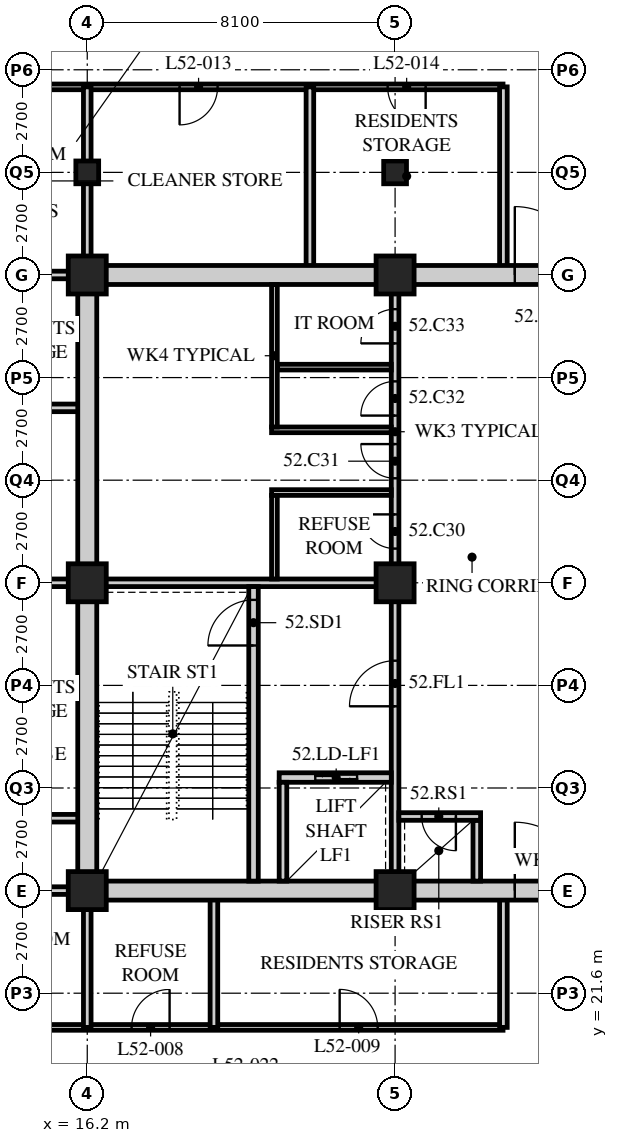
"""IFC4 building model, lengths in metres.
Left out: names, types, materials, properties, quantities, classifications, styles, units other than length and angle.
Written with IfcOpenShell. Run it as: python <this file> out.ifc"""

import sys

from ifc_helpers import new_model, si_unit, direction, frame, frame_2d, origin, origin_2d, place, context, subcontext, project, spatial, rectangle, hollow_rectangle, extrude, element, fill, save


model = new_model("IFC4")
c1 = context("Model", 3, precision=1e-05, world=origin(), true_north=direction((0.0, 1.0)))
c2 = subcontext(c1, "Body", "Model", "MODEL_VIEW")
j1 = project(units=[si_unit("LENGTHUNIT", "METRE"), si_unit("PLANEANGLEUNIT", "RADIAN")], contexts=[c1])
p1 = place(None, origin())
s1 = spatial("IfcSite", under=j1, at=p1, CompositionType="ELEMENT")
p2 = place(p1, origin())
s2 = spatial("IfcBuilding", under=s1, at=p2, CompositionType="ELEMENT")
p3 = place(p2, frame((0.0, 0.0, 202.8)))
s3 = spatial("IfcBuildingStorey", under=s2, at=p3, CompositionType="ELEMENT", Elevation=202.8)
for number, where, z_axis, x_axis in (
    (1, (16.2, 24.3, 0.0), (0.0, 0.0, 1.0), (1.0, 0.0, 0.0)),
    (2, (16.2, 32.4, 0.0), (0.0, 0.0, 1.0), (1.0, 0.0, 0.0)),
    (3, (16.2, 40.5, 0.0), (0.0, 0.0, 1.0), (1.0, 0.0, 0.0)),
):
    element("IfcColumn", number, at=place(p3, frame(where, z_axis=z_axis, x_axis=x_axis)), inside=s3, PredefinedType="COLUMN", context=c2, shape_type="SweptSolid", body=[
        extrude(hollow_rectangle(XDim=1.0, YDim=1.0, WallThickness=0.1, at=origin_2d()), origin(), (0.0, 0.0, 1.0), 3.6),
    ])
p4 = place(p3, frame((16.2, 43.2, 0.0), z_axis=(0.0, 0.0, 1.0), x_axis=(1.0, 0.0, 0.0)))
e4 = element("IfcColumn", 4, at=p4, inside=s3, PredefinedType="COLUMN", context=c2, shape_type="SweptSolid", body=[
    extrude(hollow_rectangle(XDim=0.6, YDim=0.6, WallThickness=0.05, at=origin_2d()), origin(), (0.0, 0.0, 1.0), 3.6),
])
for number, where, z_axis, x_axis in (
    (5, (24.3, 24.3, 0.0), (0.0, 0.0, 1.0), (1.0, 0.0, 0.0)),
    (6, (24.3, 32.4, 0.0), (0.0, 0.0, 1.0), (1.0, 0.0, 0.0)),
    (7, (24.3, 40.5, 0.0), (0.0, 0.0, 1.0), (1.0, 0.0, 0.0)),
):
    element("IfcColumn", number, at=place(p3, frame(where, z_axis=z_axis, x_axis=x_axis)), inside=s3, PredefinedType="COLUMN", context=c2, shape_type="SweptSolid", body=[
        extrude(hollow_rectangle(XDim=1.0, YDim=1.0, WallThickness=0.1, at=origin_2d()), origin(), (0.0, 0.0, 1.0), 3.6),
    ])
p5 = place(p3, frame((24.3, 43.2, 0.0), z_axis=(0.0, 0.0, 1.0), x_axis=(1.0, 0.0, 0.0)))
e8 = element("IfcColumn", 8, at=p5, inside=s3, PredefinedType="COLUMN", context=c2, shape_type="SweptSolid", body=[
    extrude(hollow_rectangle(XDim=0.6, YDim=0.6, WallThickness=0.05, at=origin_2d()), origin(), (0.0, 0.0, 1.0), 3.6),
])
p6 = place(p3, frame((27.14, 45.45, 0.0), z_axis=(0.0, 0.0, 1.0), x_axis=(-1.0, 0.0, 0.0)))
e9 = element("IfcWall", 9, at=p6, inside=s3, PredefinedType="PARTITIONING", context=c2, shape_type="SweptSolid", body=[
    extrude(rectangle(XDim=17.24, YDim=0.15, at=frame_2d((8.62, 0.0))), origin(), (0.0, 0.0, 1.0), 3.39),
])
p7 = place(p6, frame((15.94, 0.0, 0.0)))
e10 = element("IfcOpeningElement", 10, at=p7, cuts=e9, PredefinedType="OPENING", context=c2, shape_type="SweptSolid", body=[
    extrude(rectangle(XDim=1.0, YDim=2.1, at=frame_2d((0.5, 1.05))), frame((0.0, 0.085, 0.0), z_axis=(0.0, -1.0, 0.0), x_axis=(1.0, 0.0, 0.0)), (0.0, 0.0, 1.0), 0.17),
])
p8 = place(p6, frame((12.79, 0.0, 0.0)))
e11 = element("IfcOpeningElement", 11, at=p8, cuts=e9, PredefinedType="OPENING", context=c2, shape_type="SweptSolid", body=[
    extrude(rectangle(XDim=1.0, YDim=2.1, at=frame_2d((0.5, 1.05))), frame((0.0, 0.085, 0.0), z_axis=(0.0, -1.0, 0.0), x_axis=(1.0, 0.0, 0.0)), (0.0, 0.0, 1.0), 0.17),
])
p9 = place(p6, frame((7.511, 0.0, 0.0)))
e12 = element("IfcOpeningElement", 12, at=p9, cuts=e9, PredefinedType="OPENING", context=c2, shape_type="SweptSolid", body=[
    extrude(rectangle(XDim=1.0, YDim=2.1, at=frame_2d((0.5, 1.05))), frame((0.0, 0.085, 0.0), z_axis=(0.0, -1.0, 0.0), x_axis=(1.0, 0.0, 0.0)), (0.0, 0.0, 1.0), 0.17),
])
p10 = place(p6, frame((2.036, 0.0, 0.0)))
e13 = element("IfcOpeningElement", 13, at=p10, cuts=e9, PredefinedType="OPENING", context=c2, shape_type="SweptSolid", body=[
    extrude(rectangle(XDim=1.0, YDim=2.1, at=frame_2d((0.5, 1.05))), frame((0.0, 0.085, 0.0), z_axis=(0.0, -1.0, 0.0), x_axis=(1.0, 0.0, 0.0)), (0.0, 0.0, 1.0), 0.17),
])
p11 = place(p3, frame((9.9, 20.7, 0.0), z_axis=(0.0, 0.0, 1.0), x_axis=(1.0, 0.0, 0.0)))
e14 = element("IfcWall", 14, at=p11, inside=s3, PredefinedType="PARTITIONING", context=c2, shape_type="SweptSolid", body=[
    extrude(rectangle(XDim=17.24, YDim=0.15, at=frame_2d((8.62, 0.0))), origin(), (0.0, 0.0, 1.0), 3.39),
])
p12 = place(p11, frame((2.65, 0.0, 0.0)))
e15 = element("IfcOpeningElement", 15, at=p12, cuts=e14, PredefinedType="OPENING", context=c2, shape_type="SweptSolid", body=[
    extrude(rectangle(XDim=1.0, YDim=2.1, at=frame_2d((0.5, 1.05))), frame((0.0, 0.085, 0.0), z_axis=(0.0, -1.0, 0.0), x_axis=(1.0, 0.0, 0.0)), (0.0, 0.0, 1.0), 0.17),
])
p13 = place(p11, frame((7.467, 0.0, 0.0)))
e16 = element("IfcOpeningElement", 16, at=p13, cuts=e14, PredefinedType="OPENING", context=c2, shape_type="SweptSolid", body=[
    extrude(rectangle(XDim=1.0, YDim=2.1, at=frame_2d((0.5, 1.05))), frame((0.0, 0.085, 0.0), z_axis=(0.0, -1.0, 0.0), x_axis=(1.0, 0.0, 0.0)), (0.0, 0.0, 1.0), 0.17),
])
p14 = place(p11, frame((12.942, 0.0, 0.0)))
e17 = element("IfcOpeningElement", 17, at=p14, cuts=e14, PredefinedType="OPENING", context=c2, shape_type="SweptSolid", body=[
    extrude(rectangle(XDim=1.0, YDim=2.1, at=frame_2d((0.5, 1.05))), frame((0.0, 0.085, 0.0), z_axis=(0.0, -1.0, 0.0), x_axis=(1.0, 0.0, 0.0)), (0.0, 0.0, 1.0), 0.17),
])
for number, where, z_axis, x_axis in (
    (18, (9.9, 32.4, 0.0), (0.0, 0.0, 1.0), (1.0, 0.0, 0.0)),
    (19, (9.9, 26.205, 0.0), (0.0, 0.0, 1.0), (1.0, 0.0, 0.0)),
    (20, (9.9, 37.003, 0.0), (0.0, 0.0, 1.0), (1.0, 0.0, 0.0)),
):
    element("IfcWall", number, at=place(p3, frame(where, z_axis=z_axis, x_axis=x_axis)), inside=s3, PredefinedType="SOLIDWALL", context=c2, shape_type="SweptSolid", body=[
        extrude(rectangle(XDim=6.3, YDim=0.2, at=frame_2d((3.15, 0.0))), origin(), (0.0, 0.0, 1.0), 3.39),
    ])
p15 = place(p3, frame((16.2, 20.7, 0.0), z_axis=(0.0, 0.0, 1.0), x_axis=(0.0, 1.0, 0.0)))
e21 = element("IfcWall", 21, at=p15, inside=s3, PredefinedType="SOLIDWALL", context=c2, shape_type="SweptSolid", body=[
    extrude(rectangle(XDim=3.6, YDim=0.2, at=frame_2d((1.8, 0.0))), origin(), (0.0, 0.0, 1.0), 2.778),
])
for number, where, z_axis, x_axis in (
    (22, (19.533, 20.7, 0.0), (0.0, 0.0, 1.0), (0.0, 1.0, 0.0)),
    (23, (27.15, 20.7, 0.0), (0.0, 0.0, 1.0), (0.0, 1.0, 0.0)),
):
    element("IfcWall", number, at=place(p3, frame(where, z_axis=z_axis, x_axis=x_axis)), inside=s3, PredefinedType="SOLIDWALL", context=c2, shape_type="SweptSolid", body=[
        extrude(rectangle(XDim=3.6, YDim=0.2, at=frame_2d((1.8, 0.0))), origin(), (0.0, 0.0, 1.0), 3.39),
    ])
p16 = place(p3, frame((16.2, 40.5, 0.0), z_axis=(0.0, 0.0, 1.0), x_axis=(0.0, 1.0, 0.0)))
e24 = element("IfcWall", 24, at=p16, inside=s3, PredefinedType="SOLIDWALL", context=c2, shape_type="SweptSolid", body=[
    extrude(rectangle(XDim=4.95, YDim=0.2, at=frame_2d((2.475, 0.0))), origin(), (0.0, 0.0, 1.0), 2.69),
])
for number, where, z_axis, x_axis in (
    (25, (22.059, 45.45, 0.0), (0.0, 0.0, 1.0), (0.0, -1.0, 0.0)),
    (26, (27.15, 40.5, 0.0), (0.0, 0.0, 1.0), (0.0, 1.0, 0.0)),
):
    element("IfcWall", number, at=place(p3, frame(where, z_axis=z_axis, x_axis=x_axis)), inside=s3, PredefinedType="SOLIDWALL", context=c2, shape_type="SweptSolid", body=[
        extrude(rectangle(XDim=4.95, YDim=0.2, at=frame_2d((2.475, 0.0))), origin(), (0.0, 0.0, 1.0), 3.39),
    ])
for number, where, z_axis, x_axis in (
    (27, (9.9, 24.3, 0.0), (0.0, 0.0, 1.0), (1.0, 0.0, 0.0)),
    (28, (9.9, 40.5, 0.0), (0.0, 0.0, 1.0), (1.0, 0.0, 0.0)),
):
    element("IfcWall", number, at=place(p3, frame(where, z_axis=z_axis, x_axis=x_axis)), inside=s3, PredefinedType="SOLIDWALL", context=c2, shape_type="SweptSolid", body=[
        extrude(rectangle(XDim=6.3, YDim=0.2, at=frame_2d((3.15, 0.0))), origin(), (0.0, 0.0, 1.0), 3.39),
    ])
p17 = place(p3, frame((15.95, 24.3, 0.0), z_axis=(0.0, 0.0, 1.0), x_axis=(1.0, 0.0, 0.0)))
e29 = element("IfcWall", 29, at=p17, inside=s3, PredefinedType="SOLIDWALL", context=c2, shape_type="SweptSolid", body=[
    extrude(rectangle(XDim=24.8, YDim=0.5, at=frame_2d((12.4, 0.0))), origin(), (0.0, 0.0, 1.0), 2.74),
])
p18 = place(p17, frame((11.5, 0.0, 0.0)))
e30 = element("IfcOpeningElement", 30, at=p18, cuts=e29, PredefinedType="OPENING", context=c2, shape_type="SweptSolid", body=[
    extrude(rectangle(XDim=1.8, YDim=2.4, at=frame_2d((0.9, 1.2))), frame((0.0, 0.26, 0.0), z_axis=(0.0, -1.0, 0.0), x_axis=(1.0, 0.0, 0.0)), (0.0, 0.0, 1.0), 0.52),
])
p19 = place(p3, frame((15.95, 40.5, 0.0), z_axis=(0.0, 0.0, 1.0), x_axis=(1.0, 0.0, 0.0)))
e31 = element("IfcWall", 31, at=p19, inside=s3, PredefinedType="SOLIDWALL", context=c2, shape_type="SweptSolid", body=[
    extrude(rectangle(XDim=24.8, YDim=0.5, at=frame_2d((12.4, 0.0))), origin(), (0.0, 0.0, 1.0), 2.74),
])
p20 = place(p19, frame((11.5, 0.0, 0.0)))
e32 = element("IfcOpeningElement", 32, at=p20, cuts=e31, PredefinedType="OPENING", context=c2, shape_type="SweptSolid", body=[
    extrude(rectangle(XDim=1.8, YDim=2.4, at=frame_2d((0.9, 1.2))), frame((0.0, 0.26, 0.0), z_axis=(0.0, -1.0, 0.0), x_axis=(1.0, 0.0, 0.0)), (0.0, 0.0, 1.0), 0.52),
])
p21 = place(p3, frame((16.2, 24.55, 0.0), z_axis=(0.0, 0.0, 1.0), x_axis=(0.0, 1.0, 0.0)))
e33 = element("IfcWall", 33, at=p21, inside=s3, PredefinedType="SOLIDWALL", context=c2, shape_type="SweptSolid", body=[
    extrude(rectangle(XDim=15.7, YDim=0.5, at=frame_2d((7.85, 0.0))), origin(), (0.0, 0.0, 1.0), 2.778),
])
p22 = place(p3, frame((16.45, 32.4, 0.0), z_axis=(0.0, 0.0, 1.0), x_axis=(1.0, 0.0, 0.0)))
e34 = element("IfcWall", 34, at=p22, inside=s3, PredefinedType="SOLIDWALL", context=c2, shape_type="SweptSolid", body=[
    extrude(rectangle(XDim=7.95, YDim=0.2, at=frame_2d((3.975, 0.0))), origin(), (0.0, 0.0, 1.0), 2.778),
])
p23 = place(p3, frame((24.3, 24.55, 0.0), z_axis=(0.0, 0.0, 1.0), x_axis=(0.0, 1.0, 0.0)))
e35 = element("IfcWall", 35, at=p23, inside=s3, PredefinedType="SOLIDWALL", context=c2, shape_type="SweptSolid", body=[
    extrude(rectangle(XDim=7.75, YDim=0.2, at=frame_2d((3.875, 0.0))), origin(), (0.0, 0.0, 1.0), 2.778),
])
p24 = place(p23, frame((4.6, 0.0, 0.0)))
e36 = element("IfcOpeningElement", 36, at=p24, cuts=e35, PredefinedType="OPENING", context=c2, shape_type="SweptSolid", body=[
    extrude(rectangle(XDim=1.2, YDim=2.1, at=frame_2d((0.6, 1.05))), frame((0.0, 0.11, 0.0), z_axis=(0.0, -1.0, 0.0), x_axis=(1.0, 0.0, 0.0)), (0.0, 0.0, 1.0), 0.22),
])
p25 = place(p3, frame((20.575, 24.55, 0.0), z_axis=(0.0, 0.0, 1.0), x_axis=(0.0, 1.0, 0.0)))
e37 = element("IfcWall", 37, at=p25, inside=s3, PredefinedType="SOLIDWALL", context=c2, shape_type="SweptSolid", body=[
    extrude(rectangle(XDim=7.75, YDim=0.25, at=frame_2d((3.875, 0.0))), origin(), (0.0, 0.0, 1.0), 3.39),
])
p26 = place(p25, frame((6.2, 0.0, 0.0)))
e38 = element("IfcOpeningElement", 38, at=p26, cuts=e37, PredefinedType="OPENING", context=c2, shape_type="SweptSolid", body=[
    extrude(rectangle(XDim=1.2, YDim=2.1, at=frame_2d((0.6, 1.05))), frame((0.0, 0.135, 0.0), z_axis=(0.0, -1.0, 0.0), x_axis=(1.0, 0.0, 0.0)), (0.0, 0.0, 1.0), 0.27),
])
p27 = place(p3, frame((21.25, 27.275, 0.0), z_axis=(0.0, 0.0, 1.0), x_axis=(1.0, 0.0, 0.0)))
e39 = element("IfcWall", 39, at=p27, inside=s3, PredefinedType="SOLIDWALL", context=c2, shape_type="SweptSolid", body=[
    extrude(rectangle(XDim=2.95, YDim=0.25, at=frame_2d((1.475, 0.0))), origin(), (0.0, 0.0, 1.0), 3.39),
])
p28 = place(p27, frame((0.95, 0.0, 0.0)))
e40 = element("IfcOpeningElement", 40, at=p28, cuts=e39, PredefinedType="OPENING", context=c2, shape_type="SweptSolid", body=[
    extrude(rectangle(XDim=1.1, YDim=2.4, at=frame_2d((0.55, 1.2))), frame((0.0, 0.135, 0.0), z_axis=(0.0, -1.0, 0.0), x_axis=(1.0, 0.0, 0.0)), (0.0, 0.0, 1.0), 0.27),
])
p29 = place(p3, frame((21.35, 24.55, 0.0), z_axis=(0.0, 0.0, 1.0), x_axis=(0.0, 1.0, 0.0)))
e41 = element("IfcWall", 41, at=p29, inside=s3, PredefinedType="SOLIDWALL", context=c2, shape_type="SweptSolid", body=[
    extrude(rectangle(XDim=2.6, YDim=0.2, at=frame_2d((1.3, 0.0))), origin(), (0.0, 0.0, 1.0), 3.39),
])
p30 = place(p3, frame((26.45, 24.55, 0.0), z_axis=(0.0, 0.0, 1.0), x_axis=(0.0, 1.0, 0.0)))
e42 = element("IfcWall", 42, at=p30, inside=s3, PredefinedType="SOLIDWALL", context=c2, shape_type="SweptSolid", body=[
    extrude(rectangle(XDim=1.6, YDim=0.2, at=frame_2d((0.8, 0.0))), origin(), (0.0, 0.0, 1.0), 3.39),
])
p31 = place(p3, frame((24.4, 26.25, 0.0), z_axis=(0.0, 0.0, 1.0), x_axis=(1.0, 0.0, 0.0)))
e43 = element("IfcWall", 43, at=p31, inside=s3, PredefinedType="SOLIDWALL", context=c2, shape_type="SweptSolid", body=[
    extrude(rectangle(XDim=2.15, YDim=0.2, at=frame_2d((1.075, 0.0))), origin(), (0.0, 0.0, 1.0), 3.39),
])
p32 = place(p31, frame((0.6, 0.0, 0.0)))
e44 = element("IfcOpeningElement", 44, at=p32, cuts=e43, PredefinedType="OPENING", context=c2, shape_type="SweptSolid", body=[
    extrude(rectangle(XDim=0.9, YDim=2.1, at=frame_2d((0.45, 1.05))), frame((0.0, 0.11, 0.0), z_axis=(0.0, -1.0, 0.0), x_axis=(1.0, 0.0, 0.0)), (0.0, 0.0, 1.0), 0.22),
])
p33 = place(p3, frame((24.3, 32.5, 0.0), z_axis=(0.0, 0.0, 1.0), x_axis=(0.0, 1.0, 0.0)))
e45 = element("IfcWall", 45, at=p33, inside=s3, PredefinedType="PARTITIONING", context=c2, shape_type="SweptSolid", body=[
    extrude(rectangle(XDim=7.75, YDim=0.2, at=frame_2d((3.875, 0.0))), origin(), (0.0, 0.0, 1.0), 2.778),
])
p34 = place(p33, frame((0.8, 0.0, 0.0)))
e46 = element("IfcOpeningElement", 46, at=p34, cuts=e45, PredefinedType="OPENING", context=c2, shape_type="SweptSolid", body=[
    extrude(rectangle(XDim=0.9, YDim=2.1, at=frame_2d((0.45, 1.05))), frame((0.0, 0.11, 0.0), z_axis=(0.0, -1.0, 0.0), x_axis=(1.0, 0.0, 0.0)), (0.0, 0.0, 1.0), 0.22),
])
p35 = place(p33, frame((2.65, 0.0, 0.0)))
e47 = element("IfcOpeningElement", 47, at=p35, cuts=e45, PredefinedType="OPENING", context=c2, shape_type="SweptSolid", body=[
    extrude(rectangle(XDim=0.9, YDim=2.1, at=frame_2d((0.45, 1.05))), frame((0.0, 0.11, 0.0), z_axis=(0.0, -1.0, 0.0), x_axis=(1.0, 0.0, 0.0)), (0.0, 0.0, 1.0), 0.22),
])
p36 = place(p33, frame((4.3, 0.0, 0.0)))
e48 = element("IfcOpeningElement", 48, at=p36, cuts=e45, PredefinedType="OPENING", context=c2, shape_type="SweptSolid", body=[
    extrude(rectangle(XDim=0.9, YDim=2.1, at=frame_2d((0.45, 1.05))), frame((0.0, 0.11, 0.0), z_axis=(0.0, -1.0, 0.0), x_axis=(1.0, 0.0, 0.0)), (0.0, 0.0, 1.0), 0.22),
])
p37 = place(p33, frame((6.2, 0.0, 0.0)))
e49 = element("IfcOpeningElement", 49, at=p37, cuts=e45, PredefinedType="OPENING", context=c2, shape_type="SweptSolid", body=[
    extrude(rectangle(XDim=0.9, YDim=2.1, at=frame_2d((0.45, 1.05))), frame((0.0, 0.11, 0.0), z_axis=(0.0, -1.0, 0.0), x_axis=(1.0, 0.0, 0.0)), (0.0, 0.0, 1.0), 0.22),
])
for number, where, z_axis, x_axis in (
    (50, (21.05, 34.775, 0.0), (0.0, 0.0, 1.0), (1.0, 0.0, 0.0)),
    (51, (21.05, 36.425, 0.0), (0.0, 0.0, 1.0), (1.0, 0.0, 0.0)),
):
    element("IfcWall", number, at=place(p3, frame(where, z_axis=z_axis, x_axis=x_axis)), inside=s3, PredefinedType="PARTITIONING", context=c2, shape_type="SweptSolid", body=[
        extrude(rectangle(XDim=3.15, YDim=0.15, at=frame_2d((1.575, 0.0))), origin(), (0.0, 0.0, 1.0), 3.39),
    ])
p38 = place(p3, frame((21.2, 38.075, 0.0), z_axis=(0.0, 0.0, 1.0), x_axis=(1.0, 0.0, 0.0)))
e52 = element("IfcWall", 52, at=p38, inside=s3, PredefinedType="PARTITIONING", context=c2, shape_type="SweptSolid", body=[
    extrude(rectangle(XDim=3.0, YDim=0.15, at=frame_2d((1.5, 0.0))), origin(), (0.0, 0.0, 1.0), 3.39),
])
p39 = place(p3, frame((21.125, 32.5, 0.0), z_axis=(0.0, 0.0, 1.0), x_axis=(0.0, 1.0, 0.0)))
e53 = element("IfcWall", 53, at=p39, inside=s3, PredefinedType="PARTITIONING", context=c2, shape_type="SweptSolid", body=[
    extrude(rectangle(XDim=2.2, YDim=0.15, at=frame_2d((1.1, 0.0))), origin(), (0.0, 0.0, 1.0), 3.39),
])
p40 = place(p3, frame((21.125, 36.5, 0.0), z_axis=(0.0, 0.0, 1.0), x_axis=(0.0, 1.0, 0.0)))
e54 = element("IfcWall", 54, at=p40, inside=s3, PredefinedType="PARTITIONING", context=c2, shape_type="SweptSolid", body=[
    extrude(rectangle(XDim=3.75, YDim=0.15, at=frame_2d((1.875, 0.0))), origin(), (0.0, 0.0, 1.0), 3.39),
])
p41 = place(p13, origin())
e55 = element("IfcDoor", 55, at=p41, inside=s3, OperationType="SINGLE_SWING_RIGHT", PredefinedType="DOOR", context=c2, shape_type="SweptSolid", body=[
    extrude(rectangle(XDim=1.0, YDim=2.1, at=frame_2d((0.5, 1.05))), frame((0.0, 0.025, 0.0), z_axis=(0.0, -1.0, 0.0), x_axis=(1.0, 0.0, 0.0)), (0.0, 0.0, 1.0), 0.05),
])
fill(e16, e55)
p42 = place(p14, origin())
e56 = element("IfcDoor", 56, at=p42, inside=s3, OperationType="SINGLE_SWING_LEFT", PredefinedType="DOOR", context=c2, shape_type="SweptSolid", body=[
    extrude(rectangle(XDim=1.0, YDim=2.1, at=frame_2d((0.5, 1.05))), frame((0.0, 0.025, 0.0), z_axis=(0.0, -1.0, 0.0), x_axis=(1.0, 0.0, 0.0)), (0.0, 0.0, 1.0), 0.05),
])
fill(e17, e56)
p43 = place(p9, origin())
e57 = element("IfcDoor", 57, at=p43, inside=s3, OperationType="SINGLE_SWING_RIGHT", PredefinedType="DOOR", context=c2, shape_type="SweptSolid", body=[
    extrude(rectangle(XDim=1.0, YDim=2.1, at=frame_2d((0.5, 1.05))), frame((0.0, 0.025, 0.0), z_axis=(0.0, -1.0, 0.0), x_axis=(1.0, 0.0, 0.0)), (0.0, 0.0, 1.0), 0.05),
])
fill(e12, e57)
p44 = place(p10, origin())
e58 = element("IfcDoor", 58, at=p44, inside=s3, OperationType="SINGLE_SWING_LEFT", PredefinedType="DOOR", context=c2, shape_type="SweptSolid", body=[
    extrude(rectangle(XDim=1.0, YDim=2.1, at=frame_2d((0.5, 1.05))), frame((0.0, 0.025, 0.0), z_axis=(0.0, -1.0, 0.0), x_axis=(1.0, 0.0, 0.0)), (0.0, 0.0, 1.0), 0.05),
])
fill(e13, e58)
p45 = place(p34, origin())
e59 = element("IfcDoor", 59, at=p45, inside=s3, OperationType="SINGLE_SWING_RIGHT", PredefinedType="DOOR", context=c2, shape_type="SweptSolid", body=[
    extrude(rectangle(XDim=0.9, YDim=2.1, at=frame_2d((0.45, 1.05))), frame((0.0, 0.025, 0.0), z_axis=(0.0, -1.0, 0.0), x_axis=(1.0, 0.0, 0.0)), (0.0, 0.0, 1.0), 0.05),
])
fill(e46, e59)
p46 = place(p35, origin())
e60 = element("IfcDoor", 60, at=p46, inside=s3, OperationType="SINGLE_SWING_RIGHT", PredefinedType="DOOR", context=c2, shape_type="SweptSolid", body=[
    extrude(rectangle(XDim=0.9, YDim=2.1, at=frame_2d((0.45, 1.05))), frame((0.0, 0.025, 0.0), z_axis=(0.0, -1.0, 0.0), x_axis=(1.0, 0.0, 0.0)), (0.0, 0.0, 1.0), 0.05),
])
fill(e47, e60)
p47 = place(p36, origin())
e61 = element("IfcDoor", 61, at=p47, inside=s3, OperationType="SINGLE_SWING_LEFT", PredefinedType="DOOR", context=c2, shape_type="SweptSolid", body=[
    extrude(rectangle(XDim=0.9, YDim=2.1, at=frame_2d((0.45, 1.05))), frame((0.0, 0.025, 0.0), z_axis=(0.0, -1.0, 0.0), x_axis=(1.0, 0.0, 0.0)), (0.0, 0.0, 1.0), 0.05),
])
fill(e48, e61)
p48 = place(p37, origin())
e62 = element("IfcDoor", 62, at=p48, inside=s3, OperationType="SINGLE_SWING_LEFT", PredefinedType="DOOR", context=c2, shape_type="SweptSolid", body=[
    extrude(rectangle(XDim=0.9, YDim=2.1, at=frame_2d((0.45, 1.05))), frame((0.0, 0.025, 0.0), z_axis=(0.0, -1.0, 0.0), x_axis=(1.0, 0.0, 0.0)), (0.0, 0.0, 1.0), 0.05),
])
fill(e49, e62)
p49 = place(p26, origin())
e63 = element("IfcDoor", 63, at=p49, inside=s3, OperationType="SINGLE_SWING_LEFT", PredefinedType="DOOR", context=c2, shape_type="SweptSolid", body=[
    extrude(rectangle(XDim=1.2, YDim=2.1, at=frame_2d((0.6, 1.05))), frame((0.0, 0.025, 0.0), z_axis=(0.0, -1.0, 0.0), x_axis=(1.0, 0.0, 0.0)), (0.0, 0.0, 1.0), 0.05),
])
fill(e38, e63)
p50 = place(p24, origin())
e64 = element("IfcDoor", 64, at=p50, inside=s3, OperationType="SINGLE_SWING_LEFT", PredefinedType="DOOR", context=c2, shape_type="SweptSolid", body=[
    extrude(rectangle(XDim=1.2, YDim=2.1, at=frame_2d((0.6, 1.05))), frame((0.0, 0.025, 0.0), z_axis=(0.0, -1.0, 0.0), x_axis=(1.0, 0.0, 0.0)), (0.0, 0.0, 1.0), 0.05),
])
fill(e36, e64)
p51 = place(p32, origin())
e65 = element("IfcDoor", 65, at=p51, inside=s3, OperationType="SINGLE_SWING_LEFT", PredefinedType="DOOR", context=c2, shape_type="SweptSolid", body=[
    extrude(rectangle(XDim=0.9, YDim=2.1, at=frame_2d((0.45, 1.05))), frame((0.0, 0.025, 0.0), z_axis=(0.0, -1.0, 0.0), x_axis=(1.0, 0.0, 0.0)), (0.0, 0.0, 1.0), 0.05),
])
fill(e44, e65)
p52 = place(p28, origin())
e66 = element("IfcDoor", 66, at=p52, inside=s3, OperationType="DOUBLE_DOOR_SLIDING", PredefinedType="DOOR", context=c2, shape_type="SweptSolid", body=[
    extrude(rectangle(XDim=1.1, YDim=2.4, at=frame_2d((0.55, 1.2))), frame((0.0, 0.025, 0.0), z_axis=(0.0, -1.0, 0.0), x_axis=(1.0, 0.0, 0.0)), (0.0, 0.0, 1.0), 0.05),
])
fill(e40, e66)
p53 = place(p18, origin())
e67 = element("IfcDoor", 67, at=p53, inside=s3, OperationType="DOUBLE_DOOR_SINGLE_SWING", PredefinedType="DOOR", context=c2, shape_type="SweptSolid", body=[
    extrude(rectangle(XDim=1.8, YDim=2.4, at=frame_2d((0.9, 1.2))), frame((0.0, 0.025, 0.0), z_axis=(0.0, -1.0, 0.0), x_axis=(1.0, 0.0, 0.0)), (0.0, 0.0, 1.0), 0.05),
])
fill(e30, e67)
p54 = place(p20, origin())
e68 = element("IfcDoor", 68, at=p54, inside=s3, OperationType="DOUBLE_DOOR_SINGLE_SWING", PredefinedType="DOOR", context=c2, shape_type="SweptSolid", body=[
    extrude(rectangle(XDim=1.8, YDim=2.4, at=frame_2d((0.9, 1.2))), frame((0.0, 0.025, 0.0), z_axis=(0.0, -1.0, 0.0), x_axis=(1.0, 0.0, 0.0)), (0.0, 0.0, 1.0), 0.05),
])
fill(e32, e68)
save(model, sys.argv[1])
